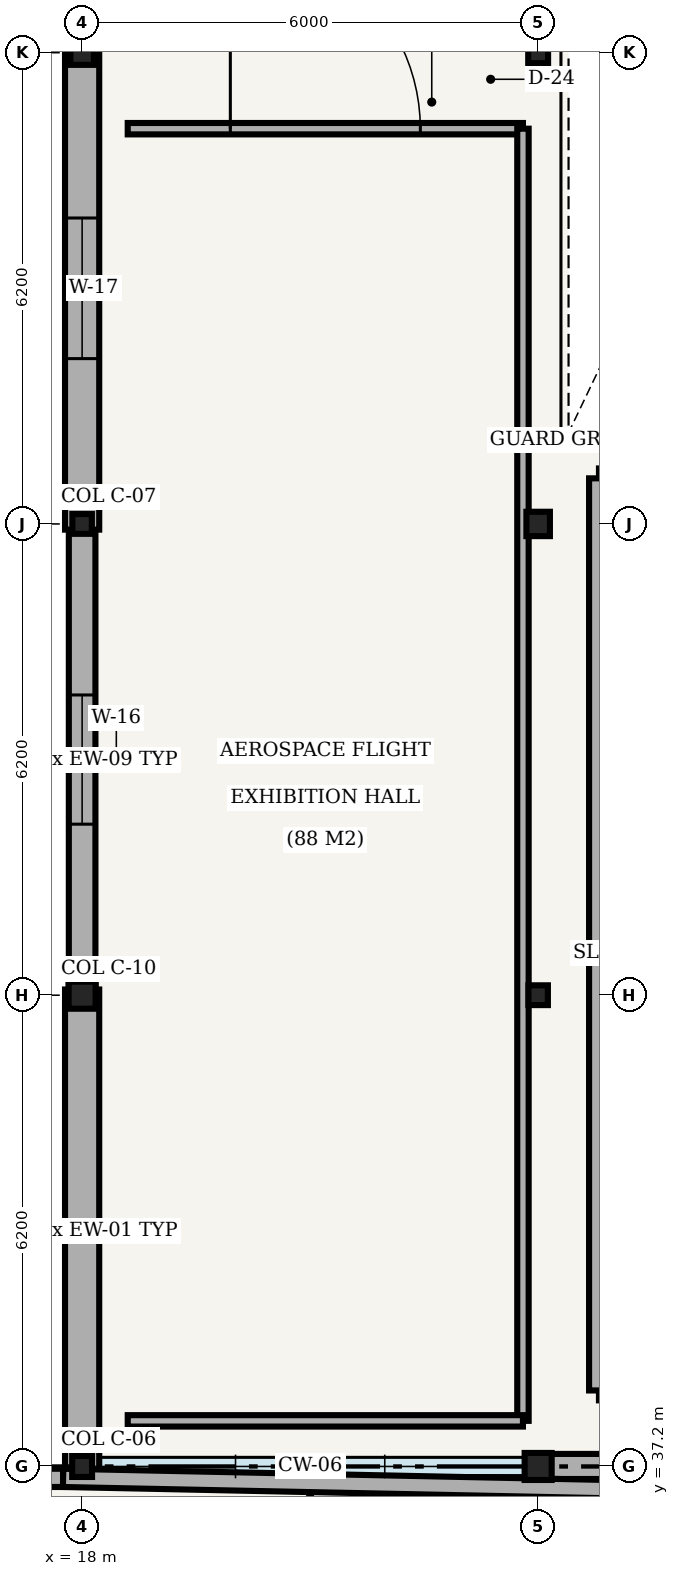
"""IFC4 building model, lengths in metres.
Left out: names, types, materials, properties, quantities, classifications, styles, units other than length and angle.
Written with IfcOpenShell. Run it as: python <this file> out.ifc"""

import sys

from ifc_helpers import new_model, si_unit, direction, frame, frame_2d, origin, origin_2d, place, context, subcontext, project, spatial, rectangle, hollow_circle, i_section, extrude, element, fill, save


model = new_model("IFC4")
c1 = context("Model", 3, precision=1e-05, world=origin(), true_north=direction((0.0, 1.0)))
c2 = subcontext(c1, "Body", "Model", "MODEL_VIEW")
j1 = project(units=[si_unit("LENGTHUNIT", "METRE"), si_unit("PLANEANGLEUNIT", "RADIAN")], contexts=[c1])
p1 = place(None, origin())
s1 = spatial("IfcSite", under=j1, at=p1, CompositionType="ELEMENT")
p2 = place(p1, origin())
s2 = spatial("IfcBuilding", under=s1, at=p2, CompositionType="ELEMENT")
p3 = place(p2, frame((0.0, 0.0, 10.8)))
s3 = spatial("IfcBuildingStorey", under=s2, at=p3, CompositionType="ELEMENT", Elevation=10.8)
p4 = place(p3, frame((18.0, 37.2, 0.0), z_axis=(0.0, 0.0, 1.0), x_axis=(1.0, 0.0, 0.0)))
e1 = element("IfcColumn", 1, at=p4, inside=s3, PredefinedType="COLUMN", context=c2, shape_type="SweptSolid", body=[
    extrude(i_section(OverallWidth=0.261, OverallDepth=0.276, WebThickness=0.015, FlangeThickness=0.025, FilletRadius=0.013, at=origin_2d()), origin(), (0.0, 0.0, 1.0), 5.37),
])
p5 = place(p3, frame((18.0, 43.4, 0.0), z_axis=(0.0, 0.0, 1.0), x_axis=(1.0, 0.0, 0.0)))
e2 = element("IfcColumn", 2, at=p5, inside=s3, PredefinedType="COLUMN", context=c2, shape_type="SweptSolid", body=[
    extrude(hollow_circle(Radius=0.178, WallThickness=0.012, at=origin_2d()), origin(), (0.0, 0.0, 1.0), 5.37),
])
p6 = place(p3, frame((18.0, 49.6, 0.0), z_axis=(0.0, 0.0, 1.0), x_axis=(1.0, 0.0, 0.0)))
e3 = element("IfcColumn", 3, at=p6, inside=s3, PredefinedType="COLUMN", context=c2, shape_type="SweptSolid", body=[
    extrude(i_section(OverallWidth=0.256, OverallDepth=0.26, WebThickness=0.01, FlangeThickness=0.017, FilletRadius=0.013, at=origin_2d()), origin(), (0.0, 0.0, 1.0), 5.37),
])
p7 = place(p3, frame((18.0, 55.8, 0.0), z_axis=(0.0, 0.0, 1.0), x_axis=(1.0, 0.0, 0.0)))
e4 = element("IfcColumn", 4, at=p7, inside=s3, PredefinedType="COLUMN", context=c2, shape_type="SweptSolid", body=[
    extrude(i_section(OverallWidth=0.309, OverallDepth=0.321, WebThickness=0.014, FlangeThickness=0.022, FilletRadius=0.015, at=origin_2d()), origin(), (0.0, 0.0, 1.0), 5.37),
])
p8 = place(p3, frame((24.0, 37.2, 0.0), z_axis=(0.0, 0.0, 1.0), x_axis=(1.0, 0.0, 0.0)))
e5 = element("IfcColumn", 5, at=p8, inside=s3, PredefinedType="COLUMN", context=c2, shape_type="SweptSolid", body=[
    extrude(hollow_circle(Radius=0.178, WallThickness=0.012, at=origin_2d()), origin(), (0.0, 0.0, 1.0), 6.63),
])
p9 = place(p3, frame((24.0, 43.4, 0.0), z_axis=(0.0, 0.0, 1.0), x_axis=(1.0, 0.0, 0.0)))
e6 = element("IfcColumn", 6, at=p9, inside=s3, PredefinedType="COLUMN", context=c2, shape_type="SweptSolid", body=[
    extrude(i_section(OverallWidth=0.256, OverallDepth=0.26, WebThickness=0.01, FlangeThickness=0.017, FilletRadius=0.013, at=origin_2d()), origin(), (0.0, 0.0, 1.0), 6.63),
])
p10 = place(p3, frame((24.0, 49.6, 0.0), z_axis=(0.0, 0.0, 1.0), x_axis=(1.0, 0.0, 0.0)))
e7 = element("IfcColumn", 7, at=p10, inside=s3, PredefinedType="COLUMN", context=c2, shape_type="SweptSolid", body=[
    extrude(i_section(OverallWidth=0.309, OverallDepth=0.321, WebThickness=0.014, FlangeThickness=0.022, FilletRadius=0.015, at=origin_2d()), origin(), (0.0, 0.0, 1.0), 6.63),
])
p11 = place(p3, frame((24.0, 55.8, 0.0), z_axis=(0.0, 0.0, 1.0), x_axis=(1.0, 0.0, 0.0)))
e8 = element("IfcColumn", 8, at=p11, inside=s3, PredefinedType="COLUMN", context=c2, shape_type="SweptSolid", body=[
    extrude(i_section(OverallWidth=0.261, OverallDepth=0.276, WebThickness=0.015, FlangeThickness=0.025, FilletRadius=0.013, at=origin_2d()), origin(), (0.0, 0.0, 1.0), 6.63),
])
p12 = place(p3, frame((23.925, 37.2, 0.0), z_axis=(0.0, 0.0, 1.0), x_axis=(1.0, 0.0, 0.0)))
e9 = element("IfcWall", 9, at=p12, inside=s3, PredefinedType="SOLIDWALL", context=c2, shape_type="SweptSolid", body=[
    extrude(rectangle(XDim=6.15, YDim=0.33, at=frame_2d((3.075, 0.0))), origin(), (0.0, 0.0, 1.0), 3.84),
])
p13 = place(p12, frame((2.45, 0.0, 0.9)))
e10 = element("IfcOpeningElement", 10, at=p13, cuts=e9, PredefinedType="OPENING", context=c2, shape_type="SweptSolid", body=[
    extrude(rectangle(XDim=1.25, YDim=1.5, at=frame_2d((0.625, 0.75))), frame((0.0, 0.175, 0.0), z_axis=(0.0, -1.0, 0.0), x_axis=(1.0, 0.0, 0.0)), (0.0, 0.0, 1.0), 0.35),
])
p14 = place(p3, frame((18.0, 43.475, 0.0), z_axis=(0.0, 0.0, 1.0), x_axis=(0.0, -1.0, 0.0)))
e11 = element("IfcWall", 11, at=p14, inside=s3, PredefinedType="SOLIDWALL", context=c2, shape_type="SweptSolid", body=[
    extrude(rectangle(XDim=6.35, YDim=0.45, at=frame_2d((3.175, 0.0))), origin(), (0.0, 0.0, 1.0), 3.84),
])
p15 = place(p3, frame((18.0, 49.675, 0.0), z_axis=(0.0, 0.0, 1.0), x_axis=(0.0, -1.0, 0.0)))
e12 = element("IfcWall", 12, at=p15, inside=s3, PredefinedType="SOLIDWALL", context=c2, shape_type="SweptSolid", body=[
    extrude(rectangle(XDim=6.35, YDim=0.35, at=frame_2d((3.175, 0.0))), origin(), (0.0, 0.0, 1.0), 3.84),
])
p16 = place(p15, frame((2.325, 0.0, 0.9)))
e13 = element("IfcOpeningElement", 13, at=p16, cuts=e12, PredefinedType="OPENING", context=c2, shape_type="SweptSolid", body=[
    extrude(rectangle(XDim=1.7, YDim=1.5, at=frame_2d((0.85, 0.75))), frame((0.0, 0.185, 0.0), z_axis=(0.0, -1.0, 0.0), x_axis=(1.0, 0.0, 0.0)), (0.0, 0.0, 1.0), 0.37),
])
p17 = place(p3, frame((18.0, 55.875, 0.0), z_axis=(0.0, 0.0, 1.0), x_axis=(0.0, -1.0, 0.0)))
e14 = element("IfcWall", 14, at=p17, inside=s3, PredefinedType="SOLIDWALL", context=c2, shape_type="SweptSolid", body=[
    extrude(rectangle(XDim=6.35, YDim=0.45, at=frame_2d((3.175, 0.0))), origin(), (0.0, 0.0, 1.0), 3.84),
])
p18 = place(p17, frame((2.25, 0.0, 0.9)))
e15 = element("IfcOpeningElement", 15, at=p18, cuts=e14, PredefinedType="OPENING", context=c2, shape_type="SweptSolid", body=[
    extrude(rectangle(XDim=1.85, YDim=1.5, at=frame_2d((0.925, 0.75))), frame((0.0, 0.235, 0.0), z_axis=(0.0, -1.0, 0.0), x_axis=(1.0, 0.0, 0.0)), (0.0, 0.0, 1.0), 0.47),
])
p19 = place(p3, frame((18.0, 62.075, 0.0), z_axis=(0.0, 0.0, 1.0), x_axis=(0.0, -1.0, 0.0)))
e16 = element("IfcWall", 16, at=p19, inside=s3, PredefinedType="SOLIDWALL", context=c2, shape_type="SweptSolid", body=[
    extrude(rectangle(XDim=6.35, YDim=0.35, at=frame_2d((3.175, 0.0))), origin(), (0.0, 0.0, 1.0), 3.84),
])
p20 = place(p19, frame((2.175, 0.0, 0.9)))
e17 = element("IfcOpeningElement", 17, at=p20, cuts=e16, PredefinedType="OPENING", context=c2, shape_type="SweptSolid", body=[
    extrude(rectangle(XDim=2.0, YDim=1.5, at=frame_2d((1.0, 0.75))), frame((0.0, 0.185, 0.0), z_axis=(0.0, -1.0, 0.0), x_axis=(1.0, 0.0, 0.0)), (0.0, 0.0, 1.0), 0.37),
])
p21 = place(p3, frame((17.75, 37.05, 0.0), z_axis=(0.0, 0.0, 1.0), x_axis=(-1.0, 0.0, 0.0)))
e18 = element("IfcWall", 18, at=p21, inside=s3, PredefinedType="PARAPET", context=c2, shape_type="SweptSolid", body=[
    extrude(rectangle(XDim=17.6, YDim=0.24, at=frame_2d((8.8, 0.0))), origin(), (0.0, 0.0, 1.0), 0.9),
])
p22 = place(p3, frame((29.85, 36.8, 0.0), z_axis=(0.0, 0.0, 1.0), x_axis=(-0.99978663005, 0.02065658184, 0.0)))
e19 = element("IfcWall", 19, at=p22, inside=s3, PredefinedType="PARAPET", context=c2, shape_type="SweptSolid", body=[
    extrude(rectangle(XDim=12.103, YDim=0.24, at=frame_2d((6.051, 0.0))), origin(), (0.0, 0.0, 1.0), 0.9),
])
p23 = place(p3, frame((18.6, 54.8, 0.0), z_axis=(0.0, 0.0, 1.0), x_axis=(1.0, 0.0, 0.0)))
e20 = element("IfcWall", 20, at=p23, inside=s3, PredefinedType="PARTITIONING", context=c2, shape_type="SweptSolid", body=[
    extrude(rectangle(XDim=5.2, YDim=0.15, at=frame_2d((2.6, 0.0))), origin(), (0.0, 0.0, 1.0), 3.52),
])
p24 = place(p23, frame((1.35, 0.0, 0.0)))
e21 = element("IfcOpeningElement", 21, at=p24, cuts=e20, PredefinedType="OPENING", context=c2, shape_type="SweptSolid", body=[
    extrude(rectangle(XDim=2.5, YDim=2.25, at=frame_2d((1.25, 1.125))), frame((0.0, 0.085, 0.0), z_axis=(0.0, -1.0, 0.0), x_axis=(1.0, 0.0, 0.0)), (0.0, 0.0, 1.0), 0.17),
])
p25 = place(p3, frame((23.8, 54.8, 0.0), z_axis=(0.0, 0.0, 1.0), x_axis=(0.0, -1.0, 0.0)))
e22 = element("IfcWall", 22, at=p25, inside=s3, PredefinedType="PARTITIONING", context=c2, shape_type="SweptSolid", body=[
    extrude(rectangle(XDim=17.0, YDim=0.15, at=frame_2d((8.5, 0.0))), origin(), (0.0, 0.0, 1.0), 3.52),
])
p26 = place(p3, frame((23.8, 37.8, 0.0), z_axis=(0.0, 0.0, 1.0), x_axis=(-1.0, 0.0, 0.0)))
e23 = element("IfcWall", 23, at=p26, inside=s3, PredefinedType="PARTITIONING", context=c2, shape_type="SweptSolid", body=[
    extrude(rectangle(XDim=5.2, YDim=0.15, at=frame_2d((2.6, 0.0))), origin(), (0.0, 0.0, 1.0), 3.52),
])
p27 = place(p3, frame((24.8, 38.2, 0.0), z_axis=(0.0, 0.0, 1.0), x_axis=(0.0, 1.0, 0.0)))
e24 = element("IfcWall", 24, at=p27, inside=s3, PredefinedType="PARTITIONING", context=c2, shape_type="SweptSolid", body=[
    extrude(rectangle(XDim=12.0, YDim=0.26, at=frame_2d((6.0, 0.0))), origin(), (0.0, 0.0, 1.0), 3.52),
])
p28 = place(p16, origin())
e25 = element("IfcWindow", 25, at=p28, inside=s3, PartitioningType="SINGLE_PANEL", PredefinedType="WINDOW", context=c2, shape_type="SweptSolid", body=[
    extrude(rectangle(XDim=1.7, YDim=1.5, at=frame_2d((0.85, 0.75))), frame((0.0, 0.03, 0.0), z_axis=(0.0, -1.0, 0.0), x_axis=(1.0, 0.0, 0.0)), (0.0, 0.0, 1.0), 0.06),
])
fill(e13, e25)
p29 = place(p18, origin())
e26 = element("IfcWindow", 26, at=p29, inside=s3, PartitioningType="DOUBLE_PANEL_VERTICAL", PredefinedType="WINDOW", context=c2, shape_type="SweptSolid", body=[
    extrude(rectangle(XDim=1.85, YDim=1.5, at=frame_2d((0.925, 0.75))), frame((0.0, 0.03, 0.0), z_axis=(0.0, -1.0, 0.0), x_axis=(1.0, 0.0, 0.0)), (0.0, 0.0, 1.0), 0.06),
])
fill(e15, e26)
p30 = place(p24, origin())
e27 = element("IfcDoor", 27, at=p30, inside=s3, OperationType="DOUBLE_DOOR_SINGLE_SWING", PredefinedType="DOOR", context=c2, shape_type="SweptSolid", body=[
    extrude(rectangle(XDim=2.5, YDim=2.25, at=frame_2d((1.25, 1.125))), frame((0.0, 0.025, 0.0), z_axis=(0.0, -1.0, 0.0), x_axis=(1.0, 0.0, 0.0)), (0.0, 0.0, 1.0), 0.05),
])
fill(e21, e27)
save(model, sys.argv[1])
